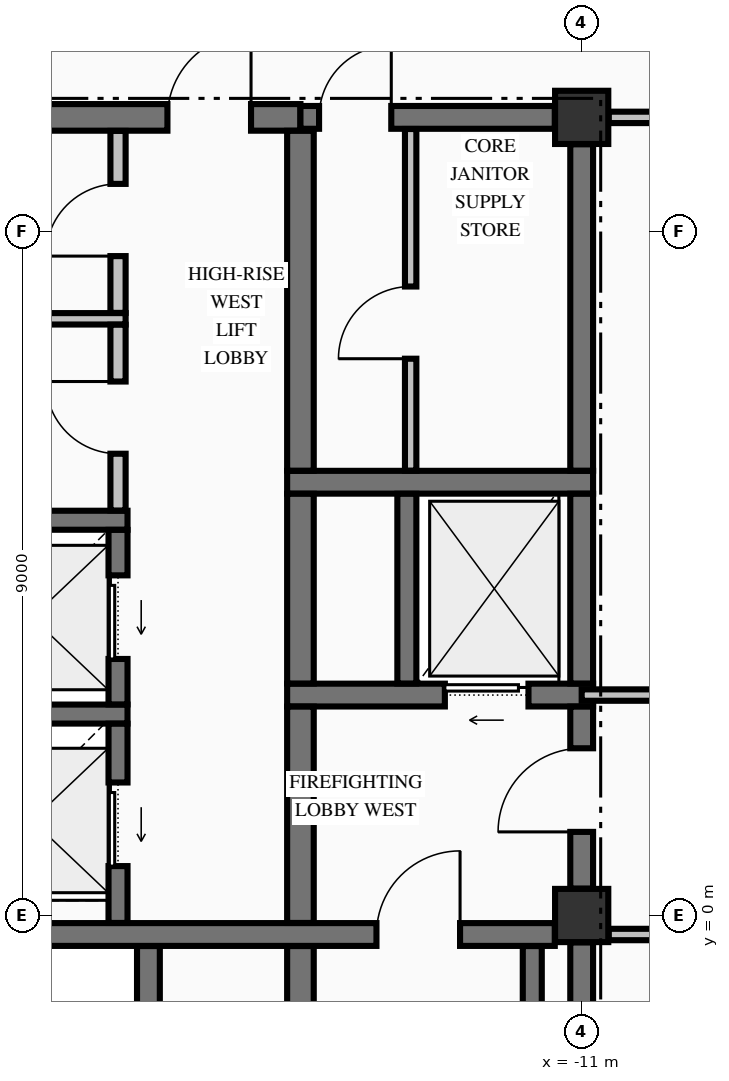
"""IFC4 building model, lengths in metres.
Left out: names, types, materials, properties, quantities, classifications, styles, units other than length and angle.
Written with IfcOpenShell. Run it as: python <this file> out.ifc"""

import sys

from ifc_helpers import new_model, si_unit, direction, frame, frame_2d, origin, origin_2d, place, context, subcontext, project, spatial, rectangle, extrude, element, fill, save


model = new_model("IFC4")
c1 = context("Model", 3, precision=1e-05, world=origin(), true_north=direction((0.0, 1.0)))
c2 = subcontext(c1, "Body", "Model", "MODEL_VIEW")
j1 = project(units=[si_unit("LENGTHUNIT", "METRE"), si_unit("PLANEANGLEUNIT", "RADIAN")], contexts=[c1])
p1 = place(None, origin())
s1 = spatial("IfcSite", under=j1, at=p1, CompositionType="ELEMENT")
p2 = place(p1, origin())
s2 = spatial("IfcBuilding", under=s1, at=p2, CompositionType="ELEMENT")
p3 = place(p2, frame((0.0, 0.0, 239.74)))
s3 = spatial("IfcBuildingStorey", under=s2, at=p3, CompositionType="ELEMENT", Elevation=239.74)
for number, where, z_axis, x_axis in (
    (1, (-11.0, 0.0, -0.25), (0.0, 0.0, 1.0), (1.0, 0.0, 0.0)),
    (2, (-11.0, 10.5, -0.25), (0.0, 0.0, 1.0), (1.0, 0.0, 0.0)),
):
    element("IfcColumn", number, at=place(p3, frame(where, z_axis=z_axis, x_axis=x_axis)), inside=s3, PredefinedType="COLUMN", context=c2, shape_type="SweptSolid", body=[
        extrude(rectangle(XDim=0.7, YDim=0.7, at=origin_2d()), origin(), (0.0, 0.0, 1.0), 3.23),
    ])
p4 = place(p3, frame((-20.571, -0.25, 0.0), z_axis=(0.0, 0.0, 1.0), x_axis=(1.0, 0.0, 0.0)))
e3 = element("IfcWall", 3, at=p4, inside=s3, PredefinedType="SHEAR", context=c2, shape_type="SweptSolid", body=[
    extrude(rectangle(XDim=9.217, YDim=0.3, at=frame_2d((4.608, 0.0))), origin(), (0.0, 0.0, 1.0), 2.98),
])
p5 = place(p4, frame((6.871, 0.0, 0.0)))
e4 = element("IfcOpeningElement", 4, at=p5, cuts=e3, PredefinedType="OPENING", context=c2, shape_type="SweptSolid", body=[
    extrude(rectangle(XDim=1.1, YDim=2.15, at=frame_2d((0.55, 1.075))), frame((0.0, 0.16, 0.0), z_axis=(0.0, -1.0, 0.0), x_axis=(1.0, 0.0, 0.0)), (0.0, 0.0, 1.0), 0.32),
])
p6 = place(p3, frame((-20.175, 2.65, 0.0), z_axis=(0.0, 0.0, 1.0), x_axis=(1.0, 0.0, 0.0)))
e5 = element("IfcWall", 5, at=p6, inside=s3, PredefinedType="SOLIDWALL", context=c2, shape_type="SweptSolid", body=[
    extrude(rectangle(XDim=3.2, YDim=0.25, at=frame_2d((1.6, 0.0))), origin(), (0.0, 0.0, 1.0), 2.98),
])
p7 = place(p3, frame((-14.875, 2.9, 0.0), z_axis=(0.0, 0.0, 1.0), x_axis=(1.0, 0.0, 0.0)))
e6 = element("IfcWall", 6, at=p7, inside=s3, PredefinedType="SHEAR", context=c2, shape_type="SweptSolid", body=[
    extrude(rectangle(XDim=4.025, YDim=0.3, at=frame_2d((2.012, 0.0))), origin(), (0.0, 0.0, 1.0), 2.98),
])
p8 = place(p7, frame((2.075, 0.0, 0.0)))
e7 = element("IfcOpeningElement", 7, at=p8, cuts=e6, PredefinedType="OPENING", context=c2, shape_type="SweptSolid", body=[
    extrude(rectangle(XDim=1.1, YDim=2.2, at=frame_2d((0.55, 1.1))), frame((0.0, 0.16, 0.0), z_axis=(0.0, -1.0, 0.0), x_axis=(1.0, 0.0, 0.0)), (0.0, 0.0, 1.0), 0.32),
])
p9 = place(p3, frame((-20.175, 5.2, 0.0), z_axis=(0.0, 0.0, 1.0), x_axis=(1.0, 0.0, 0.0)))
e8 = element("IfcWall", 8, at=p9, inside=s3, PredefinedType="SOLIDWALL", context=c2, shape_type="SweptSolid", body=[
    extrude(rectangle(XDim=3.2, YDim=0.25, at=frame_2d((1.6, 0.0))), origin(), (0.0, 0.0, 1.0), 2.98),
])
p10 = place(p3, frame((-14.875, 5.7, 0.0), z_axis=(0.0, 0.0, 1.0), x_axis=(1.0, 0.0, 0.0)))
e9 = element("IfcWall", 9, at=p10, inside=s3, PredefinedType="SHEAR", context=c2, shape_type="SweptSolid", body=[
    extrude(rectangle(XDim=4.025, YDim=0.3, at=frame_2d((2.012, 0.0))), origin(), (0.0, 0.0, 1.0), 2.98),
])
p11 = place(p3, frame((-19.646, 10.5, 0.0), z_axis=(0.0, 0.0, 1.0), x_axis=(1.0, 0.0, 0.0)))
e10 = element("IfcWall", 10, at=p11, inside=s3, PredefinedType="SHEAR", context=c2, shape_type="SweptSolid", body=[
    extrude(rectangle(XDim=4.946, YDim=0.35, at=frame_2d((2.473, 0.0))), origin(), (0.0, 0.0, 1.0), 2.98),
])
p12 = place(p11, frame((3.196, 0.0, 0.0)))
e11 = element("IfcOpeningElement", 11, at=p12, cuts=e10, PredefinedType="OPENING", context=c2, shape_type="SweptSolid", body=[
    extrude(rectangle(XDim=1.1, YDim=2.15, at=frame_2d((0.55, 1.075))), frame((0.0, 0.185, 0.0), z_axis=(0.0, -1.0, 0.0), x_axis=(1.0, 0.0, 0.0)), (0.0, 0.0, 1.0), 0.37),
])
p13 = place(p3, frame((-14.7, 10.5, 0.0), z_axis=(0.0, 0.0, 1.0), x_axis=(1.0, 0.0, 0.0)))
e12 = element("IfcWall", 12, at=p13, inside=s3, PredefinedType="SHEAR", context=c2, shape_type="SweptSolid", body=[
    extrude(rectangle(XDim=3.346, YDim=0.3, at=frame_2d((1.673, 0.0))), origin(), (0.0, 0.0, 1.0), 2.98),
])
p14 = place(p13, frame((0.245, 0.0, 0.0)))
e13 = element("IfcOpeningElement", 13, at=p14, cuts=e12, PredefinedType="OPENING", context=c2, shape_type="SweptSolid", body=[
    extrude(rectangle(XDim=0.95, YDim=2.15, at=frame_2d((0.475, 1.075))), frame((0.0, 0.16, 0.0), z_axis=(0.0, -1.0, 0.0), x_axis=(1.0, 0.0, 0.0)), (0.0, 0.0, 1.0), 0.32),
])
p15 = place(p3, frame((-10.644, -0.25, 0.0), z_axis=(0.0, 0.0, 1.0), x_axis=(1.0, 0.0, 0.0)))
e14 = element("IfcWall", 14, at=p15, inside=s3, PredefinedType="PARTITIONING", context=c2, shape_type="SweptSolid", body=[
    extrude(rectangle(XDim=21.288, YDim=0.15, at=frame_2d((10.644, 0.0))), origin(), (0.0, 0.0, 1.0), 2.98),
])
p16 = place(p15, frame((8.294, 0.0, 0.0)))
e15 = element("IfcOpeningElement", 15, at=p16, cuts=e14, PredefinedType="OPENING", context=c2, shape_type="SweptSolid", body=[
    extrude(rectangle(XDim=1.1, YDim=2.15, at=frame_2d((0.55, 1.075))), frame((0.0, 0.085, 0.0), z_axis=(0.0, -1.0, 0.0), x_axis=(1.0, 0.0, 0.0)), (0.0, 0.0, 1.0), 0.17),
])
p17 = place(p15, frame((3.169, 0.0, 0.0)))
e16 = element("IfcOpeningElement", 16, at=p17, cuts=e14, PredefinedType="OPENING", context=c2, shape_type="SweptSolid", body=[
    extrude(rectangle(XDim=1.05, YDim=2.15, at=frame_2d((0.525, 1.075))), frame((0.0, 0.085, 0.0), z_axis=(0.0, -1.0, 0.0), x_axis=(1.0, 0.0, 0.0)), (0.0, 0.0, 1.0), 0.17),
])
p18 = place(p15, frame((15.319, 0.0, 0.0)))
e17 = element("IfcOpeningElement", 17, at=p18, cuts=e14, PredefinedType="OPENING", context=c2, shape_type="SweptSolid", body=[
    extrude(rectangle(XDim=0.95, YDim=2.15, at=frame_2d((0.475, 1.075))), frame((0.0, 0.085, 0.0), z_axis=(0.0, -1.0, 0.0), x_axis=(1.0, 0.0, 0.0)), (0.0, 0.0, 1.0), 0.17),
])
p19 = place(p3, frame((-11.0, 2.9, 0.0), z_axis=(0.0, 0.0, 1.0), x_axis=(1.0, 0.0, 0.0)))
e18 = element("IfcWall", 18, at=p19, inside=s3, PredefinedType="PARTITIONING", context=c2, shape_type="SweptSolid", body=[
    extrude(rectangle(XDim=22.0, YDim=0.15, at=frame_2d((11.0, 0.0))), origin(), (0.0, 0.0, 1.0), 2.98),
])
p20 = place(p19, frame((8.65, 0.0, 0.0)))
e19 = element("IfcOpeningElement", 19, at=p20, cuts=e18, PredefinedType="OPENING", context=c2, shape_type="SweptSolid", body=[
    extrude(rectangle(XDim=1.1, YDim=2.15, at=frame_2d((0.55, 1.075))), frame((0.0, 0.085, 0.0), z_axis=(0.0, -1.0, 0.0), x_axis=(1.0, 0.0, 0.0)), (0.0, 0.0, 1.0), 0.17),
])
p21 = place(p19, frame((3.525, 0.0, 0.0)))
e20 = element("IfcOpeningElement", 20, at=p21, cuts=e18, PredefinedType="OPENING", context=c2, shape_type="SweptSolid", body=[
    extrude(rectangle(XDim=1.05, YDim=2.15, at=frame_2d((0.525, 1.075))), frame((0.0, 0.085, 0.0), z_axis=(0.0, -1.0, 0.0), x_axis=(1.0, 0.0, 0.0)), (0.0, 0.0, 1.0), 0.17),
])
p22 = place(p19, frame((12.225, 0.0, 0.0)))
e21 = element("IfcOpeningElement", 21, at=p22, cuts=e18, PredefinedType="OPENING", context=c2, shape_type="SweptSolid", body=[
    extrude(rectangle(XDim=0.95, YDim=2.15, at=frame_2d((0.475, 1.075))), frame((0.0, 0.085, 0.0), z_axis=(0.0, -1.0, 0.0), x_axis=(1.0, 0.0, 0.0)), (0.0, 0.0, 1.0), 0.17),
])
p23 = place(p19, frame((18.075, 0.0, 0.0)))
e22 = element("IfcOpeningElement", 22, at=p23, cuts=e18, PredefinedType="OPENING", context=c2, shape_type="SweptSolid", body=[
    extrude(rectangle(XDim=0.95, YDim=2.15, at=frame_2d((0.475, 1.075))), frame((0.0, 0.085, 0.0), z_axis=(0.0, -1.0, 0.0), x_axis=(1.0, 0.0, 0.0)), (0.0, 0.0, 1.0), 0.17),
])
p24 = place(p3, frame((-19.822, 7.85, 0.0), z_axis=(0.0, 0.0, 1.0), x_axis=(1.0, 0.0, 0.0)))
e23 = element("IfcWall", 23, at=p24, inside=s3, PredefinedType="PARTITIONING", context=c2, shape_type="SweptSolid", body=[
    extrude(rectangle(XDim=2.822, YDim=0.15, at=frame_2d((1.411, 0.0))), origin(), (0.0, 0.0, 1.0), 2.98),
])
p25 = place(p3, frame((-10.644, 10.5, 0.0), z_axis=(0.0, 0.0, 1.0), x_axis=(1.0, 0.0, 0.0)))
e24 = element("IfcWall", 24, at=p25, inside=s3, PredefinedType="PARTITIONING", context=c2, shape_type="SweptSolid", body=[
    extrude(rectangle(XDim=21.288, YDim=0.15, at=frame_2d((10.644, 0.0))), origin(), (0.0, 0.0, 1.0), 2.98),
])
p26 = place(p25, frame((8.294, 0.0, 0.0)))
e25 = element("IfcOpeningElement", 25, at=p26, cuts=e24, PredefinedType="OPENING", context=c2, shape_type="SweptSolid", body=[
    extrude(rectangle(XDim=1.1, YDim=2.15, at=frame_2d((0.55, 1.075))), frame((0.0, 0.085, 0.0), z_axis=(0.0, -1.0, 0.0), x_axis=(1.0, 0.0, 0.0)), (0.0, 0.0, 1.0), 0.17),
])
p27 = place(p3, frame((-17.1, -0.098, 0.0), z_axis=(0.0, 0.0, 1.0), x_axis=(0.0, 1.0, 0.0)))
e26 = element("IfcWall", 26, at=p27, inside=s3, PredefinedType="SOLIDWALL", context=c2, shape_type="SweptSolid", body=[
    extrude(rectangle(XDim=2.621, YDim=0.25, at=frame_2d((1.311, 0.0))), origin(), (0.0, 0.0, 1.0), 2.98),
])
p28 = place(p27, frame((0.748, 0.0, 0.0)))
e27 = element("IfcOpeningElement", 27, at=p28, cuts=e26, PredefinedType="OPENING", context=c2, shape_type="SweptSolid", body=[
    extrude(rectangle(XDim=1.1, YDim=2.2, at=frame_2d((0.55, 1.1))), frame((0.0, 0.135, 0.0), z_axis=(0.0, -1.0, 0.0), x_axis=(1.0, 0.0, 0.0)), (0.0, 0.0, 1.0), 0.27),
])
p29 = place(p3, frame((-17.1, 2.777, 0.0), z_axis=(0.0, 0.0, 1.0), x_axis=(0.0, 1.0, 0.0)))
e28 = element("IfcWall", 28, at=p29, inside=s3, PredefinedType="SOLIDWALL", context=c2, shape_type="SweptSolid", body=[
    extrude(rectangle(XDim=2.296, YDim=0.25, at=frame_2d((1.148, 0.0))), origin(), (0.0, 0.0, 1.0), 2.98),
])
p30 = place(p29, frame((0.598, 0.0, 0.0)))
e29 = element("IfcOpeningElement", 29, at=p30, cuts=e28, PredefinedType="OPENING", context=c2, shape_type="SweptSolid", body=[
    extrude(rectangle(XDim=1.1, YDim=2.2, at=frame_2d((0.55, 1.1))), frame((0.0, 0.135, 0.0), z_axis=(0.0, -1.0, 0.0), x_axis=(1.0, 0.0, 0.0)), (0.0, 0.0, 1.0), 0.27),
])
p31 = place(p3, frame((-16.7, -9.773, 0.0), z_axis=(0.0, 0.0, 1.0), x_axis=(0.0, 1.0, 0.0)))
e30 = element("IfcWall", 30, at=p31, inside=s3, PredefinedType="SHEAR", context=c2, shape_type="SweptSolid", body=[
    extrude(rectangle(XDim=9.371, YDim=0.3, at=frame_2d((4.686, 0.0))), origin(), (0.0, 0.0, 1.0), 2.98),
])
p32 = place(p3, frame((-14.7, -9.773, 0.0), z_axis=(0.0, 0.0, 1.0), x_axis=(0.0, 1.0, 0.0)))
e31 = element("IfcWall", 31, at=p32, inside=s3, PredefinedType="SHEAR", context=c2, shape_type="SweptSolid", body=[
    extrude(rectangle(XDim=9.371, YDim=0.35, at=frame_2d((4.686, 0.0))), origin(), (0.0, 0.0, 1.0), 2.98),
])
p33 = place(p3, frame((-14.7, -0.098, 0.0), z_axis=(0.0, 0.0, 1.0), x_axis=(0.0, 1.0, 0.0)))
e32 = element("IfcWall", 32, at=p33, inside=s3, PredefinedType="SHEAR", context=c2, shape_type="SweptSolid", body=[
    extrude(rectangle(XDim=2.846, YDim=0.35, at=frame_2d((1.423, 0.0))), origin(), (0.0, 0.0, 1.0), 2.98),
])
p34 = place(p3, frame((-14.7, 3.052, 0.0), z_axis=(0.0, 0.0, 1.0), x_axis=(0.0, 1.0, 0.0)))
e33 = element("IfcWall", 33, at=p34, inside=s3, PredefinedType="SHEAR", context=c2, shape_type="SweptSolid", body=[
    extrude(rectangle(XDim=2.496, YDim=0.35, at=frame_2d((1.248, 0.0))), origin(), (0.0, 0.0, 1.0), 2.98),
])
p35 = place(p3, frame((-14.7, 5.852, 0.0), z_axis=(0.0, 0.0, 1.0), x_axis=(0.0, 1.0, 0.0)))
e34 = element("IfcWall", 34, at=p35, inside=s3, PredefinedType="SHEAR", context=c2, shape_type="SweptSolid", body=[
    extrude(rectangle(XDim=4.471, YDim=0.35, at=frame_2d((2.235, 0.0))), origin(), (0.0, 0.0, 1.0), 2.98),
])
p36 = place(p3, frame((-13.3, 3.052, 0.0), z_axis=(0.0, 0.0, 1.0), x_axis=(0.0, 1.0, 0.0)))
e35 = element("IfcWall", 35, at=p36, inside=s3, PredefinedType="SOLIDWALL", context=c2, shape_type="SweptSolid", body=[
    extrude(rectangle(XDim=2.496, YDim=0.25, at=frame_2d((1.248, 0.0))), origin(), (0.0, 0.0, 1.0), 2.98),
])
p37 = place(p3, frame((-11.65, -9.798, 0.0), z_axis=(0.0, 0.0, 1.0), x_axis=(0.0, 1.0, 0.0)))
e36 = element("IfcWall", 36, at=p37, inside=s3, PredefinedType="SOLIDWALL", context=c2, shape_type="SweptSolid", body=[
    extrude(rectangle(XDim=9.396, YDim=0.25, at=frame_2d((4.698, 0.0))), origin(), (0.0, 0.0, 1.0), 2.98),
])
p38 = place(p3, frame((-11.0, -9.596, 0.0), z_axis=(0.0, 0.0, 1.0), x_axis=(0.0, 1.0, 0.0)))
e37 = element("IfcWall", 37, at=p38, inside=s3, PredefinedType="SHEAR", context=c2, shape_type="SweptSolid", body=[
    extrude(rectangle(XDim=9.242, YDim=0.3, at=frame_2d((4.621, 0.0))), origin(), (0.0, 0.0, 1.0), 2.98),
])
p39 = place(p3, frame((-11.0, 0.354, 0.0), z_axis=(0.0, 0.0, 1.0), x_axis=(0.0, 1.0, 0.0)))
e38 = element("IfcWall", 38, at=p39, inside=s3, PredefinedType="SHEAR", context=c2, shape_type="SweptSolid", body=[
    extrude(rectangle(XDim=2.394, YDim=0.3, at=frame_2d((1.197, 0.0))), origin(), (0.0, 0.0, 1.0), 2.98),
])
p40 = place(p39, frame((0.746, 0.0, 0.0)))
e39 = element("IfcOpeningElement", 39, at=p40, cuts=e38, PredefinedType="OPENING", context=c2, shape_type="SweptSolid", body=[
    extrude(rectangle(XDim=1.1, YDim=2.15, at=frame_2d((0.55, 1.075))), frame((0.0, 0.16, 0.0), z_axis=(0.0, -1.0, 0.0), x_axis=(1.0, 0.0, 0.0)), (0.0, 0.0, 1.0), 0.32),
])
p41 = place(p3, frame((-11.0, 3.052, 0.0), z_axis=(0.0, 0.0, 1.0), x_axis=(0.0, 1.0, 0.0)))
e40 = element("IfcWall", 40, at=p41, inside=s3, PredefinedType="SHEAR", context=c2, shape_type="SweptSolid", body=[
    extrude(rectangle(XDim=2.496, YDim=0.3, at=frame_2d((1.248, 0.0))), origin(), (0.0, 0.0, 1.0), 2.98),
])
p42 = place(p3, frame((-11.0, 5.852, 0.0), z_axis=(0.0, 0.0, 1.0), x_axis=(0.0, 1.0, 0.0)))
e41 = element("IfcWall", 41, at=p42, inside=s3, PredefinedType="SHEAR", context=c2, shape_type="SweptSolid", body=[
    extrude(rectangle(XDim=4.294, YDim=0.3, at=frame_2d((2.147, 0.0))), origin(), (0.0, 0.0, 1.0), 2.98),
])
p43 = place(p3, frame((-17.1, 5.328, 0.0), z_axis=(0.0, 0.0, 1.0), x_axis=(0.0, 1.0, 0.0)))
e42 = element("IfcWall", 42, at=p43, inside=s3, PredefinedType="PARTITIONING", context=c2, shape_type="SweptSolid", body=[
    extrude(rectangle(XDim=2.444, YDim=0.2, at=frame_2d((1.222, 0.0))), origin(), (0.0, 0.0, 1.0), 2.98),
])
p44 = place(p43, frame((0.747, 0.0, 0.0)))
e43 = element("IfcOpeningElement", 43, at=p44, cuts=e42, PredefinedType="OPENING", context=c2, shape_type="SweptSolid", body=[
    extrude(rectangle(XDim=0.95, YDim=2.15, at=frame_2d((0.475, 1.075))), frame((0.0, 0.11, 0.0), z_axis=(0.0, -1.0, 0.0), x_axis=(1.0, 0.0, 0.0)), (0.0, 0.0, 1.0), 0.22),
])
p45 = place(p3, frame((-17.1, 7.928, 0.0), z_axis=(0.0, 0.0, 1.0), x_axis=(0.0, 1.0, 0.0)))
e44 = element("IfcWall", 44, at=p45, inside=s3, PredefinedType="PARTITIONING", context=c2, shape_type="SweptSolid", body=[
    extrude(rectangle(XDim=2.394, YDim=0.2, at=frame_2d((1.197, 0.0))), origin(), (0.0, 0.0, 1.0), 2.98),
])
p46 = place(p45, frame((0.747, 0.0, 0.0)))
e45 = element("IfcOpeningElement", 45, at=p46, cuts=e44, PredefinedType="OPENING", context=c2, shape_type="SweptSolid", body=[
    extrude(rectangle(XDim=0.95, YDim=2.15, at=frame_2d((0.475, 1.075))), frame((0.0, 0.11, 0.0), z_axis=(0.0, -1.0, 0.0), x_axis=(1.0, 0.0, 0.0)), (0.0, 0.0, 1.0), 0.22),
])
p47 = place(p3, frame((-13.25, 5.853, 0.0), z_axis=(0.0, 0.0, 1.0), x_axis=(0.0, 1.0, 0.0)))
e46 = element("IfcWall", 46, at=p47, inside=s3, PredefinedType="PARTITIONING", context=c2, shape_type="SweptSolid", body=[
    extrude(rectangle(XDim=4.494, YDim=0.15, at=frame_2d((2.247, 0.0))), origin(), (0.0, 0.0, 1.0), 2.98),
])
p48 = place(p47, frame((1.472, 0.0, 0.0)))
e47 = element("IfcOpeningElement", 47, at=p48, cuts=e46, PredefinedType="OPENING", context=c2, shape_type="SweptSolid", body=[
    extrude(rectangle(XDim=0.95, YDim=2.15, at=frame_2d((0.475, 1.075))), frame((0.0, 0.085, 0.0), z_axis=(0.0, -1.0, 0.0), x_axis=(1.0, 0.0, 0.0)), (0.0, 0.0, 1.0), 0.17),
])
p49 = place(p5, origin())
e48 = element("IfcDoor", 48, at=p49, inside=s3, OperationType="SINGLE_SWING_RIGHT", PredefinedType="DOOR", context=c2, shape_type="SweptSolid", body=[
    extrude(rectangle(XDim=1.1, YDim=2.15, at=frame_2d((0.55, 1.075))), frame((0.0, 0.025, 0.0), z_axis=(0.0, -1.0, 0.0), x_axis=(1.0, 0.0, 0.0)), (0.0, 0.0, 1.0), 0.05),
])
fill(e4, e48)
p50 = place(p40, origin())
e49 = element("IfcDoor", 49, at=p50, inside=s3, OperationType="SINGLE_SWING_LEFT", PredefinedType="DOOR", context=c2, shape_type="SweptSolid", body=[
    extrude(rectangle(XDim=1.1, YDim=2.15, at=frame_2d((0.55, 1.075))), frame((0.0, 0.025, 0.0), z_axis=(0.0, -1.0, 0.0), x_axis=(1.0, 0.0, 0.0)), (0.0, 0.0, 1.0), 0.05),
])
fill(e39, e49)
p51 = place(p8, origin())
e50 = element("IfcDoor", 50, at=p51, inside=s3, OperationType="SLIDING_TO_LEFT", PredefinedType="DOOR", context=c2, shape_type="SweptSolid", body=[
    extrude(rectangle(XDim=1.1, YDim=2.2, at=frame_2d((0.55, 1.1))), frame((0.0, 0.025, 0.0), z_axis=(0.0, -1.0, 0.0), x_axis=(1.0, 0.0, 0.0)), (0.0, 0.0, 1.0), 0.05),
])
fill(e7, e50)
p52 = place(p14, origin())
e51 = element("IfcDoor", 51, at=p52, inside=s3, OperationType="SINGLE_SWING_RIGHT", PredefinedType="DOOR", context=c2, shape_type="SweptSolid", body=[
    extrude(rectangle(XDim=0.95, YDim=2.15, at=frame_2d((0.475, 1.075))), frame((0.0, 0.025, 0.0), z_axis=(0.0, -1.0, 0.0), x_axis=(1.0, 0.0, 0.0)), (0.0, 0.0, 1.0), 0.05),
])
fill(e13, e51)
p53 = place(p48, origin())
e52 = element("IfcDoor", 52, at=p53, inside=s3, OperationType="SINGLE_SWING_LEFT", PredefinedType="DOOR", context=c2, shape_type="SweptSolid", body=[
    extrude(rectangle(XDim=0.95, YDim=2.15, at=frame_2d((0.475, 1.075))), frame((0.0, 0.025, 0.0), z_axis=(0.0, -1.0, 0.0), x_axis=(1.0, 0.0, 0.0)), (0.0, 0.0, 1.0), 0.05),
])
fill(e47, e52)
p54 = place(p28, origin())
e53 = element("IfcDoor", 53, at=p54, inside=s3, OperationType="SLIDING_TO_LEFT", PredefinedType="DOOR", context=c2, shape_type="SweptSolid", body=[
    extrude(rectangle(XDim=1.1, YDim=2.2, at=frame_2d((0.55, 1.1))), frame((0.0, 0.025, 0.0), z_axis=(0.0, -1.0, 0.0), x_axis=(1.0, 0.0, 0.0)), (0.0, 0.0, 1.0), 0.05),
])
fill(e27, e53)
p55 = place(p30, origin())
e54 = element("IfcDoor", 54, at=p55, inside=s3, OperationType="SLIDING_TO_LEFT", PredefinedType="DOOR", context=c2, shape_type="SweptSolid", body=[
    extrude(rectangle(XDim=1.1, YDim=2.2, at=frame_2d((0.55, 1.1))), frame((0.0, 0.025, 0.0), z_axis=(0.0, -1.0, 0.0), x_axis=(1.0, 0.0, 0.0)), (0.0, 0.0, 1.0), 0.05),
])
fill(e29, e54)
p56 = place(p12, origin())
e55 = element("IfcDoor", 55, at=p56, inside=s3, OperationType="SINGLE_SWING_RIGHT", PredefinedType="DOOR", context=c2, shape_type="SweptSolid", body=[
    extrude(rectangle(XDim=1.1, YDim=2.15, at=frame_2d((0.55, 1.075))), frame((0.0, 0.025, 0.0), z_axis=(0.0, -1.0, 0.0), x_axis=(1.0, 0.0, 0.0)), (0.0, 0.0, 1.0), 0.05),
])
fill(e11, e55)
p57 = place(p46, origin())
e56 = element("IfcDoor", 56, at=p57, inside=s3, OperationType="SINGLE_SWING_LEFT", PredefinedType="DOOR", context=c2, shape_type="SweptSolid", body=[
    extrude(rectangle(XDim=0.95, YDim=2.15, at=frame_2d((0.475, 1.075))), frame((0.0, 0.025, 0.0), z_axis=(0.0, -1.0, 0.0), x_axis=(1.0, 0.0, 0.0)), (0.0, 0.0, 1.0), 0.05),
])
fill(e45, e56)
p58 = place(p44, origin())
e57 = element("IfcDoor", 57, at=p58, inside=s3, OperationType="SINGLE_SWING_RIGHT", PredefinedType="DOOR", context=c2, shape_type="SweptSolid", body=[
    extrude(rectangle(XDim=0.95, YDim=2.15, at=frame_2d((0.475, 1.075))), frame((0.0, 0.025, 0.0), z_axis=(0.0, -1.0, 0.0), x_axis=(1.0, 0.0, 0.0)), (0.0, 0.0, 1.0), 0.05),
])
fill(e43, e57)
save(model, sys.argv[1])
